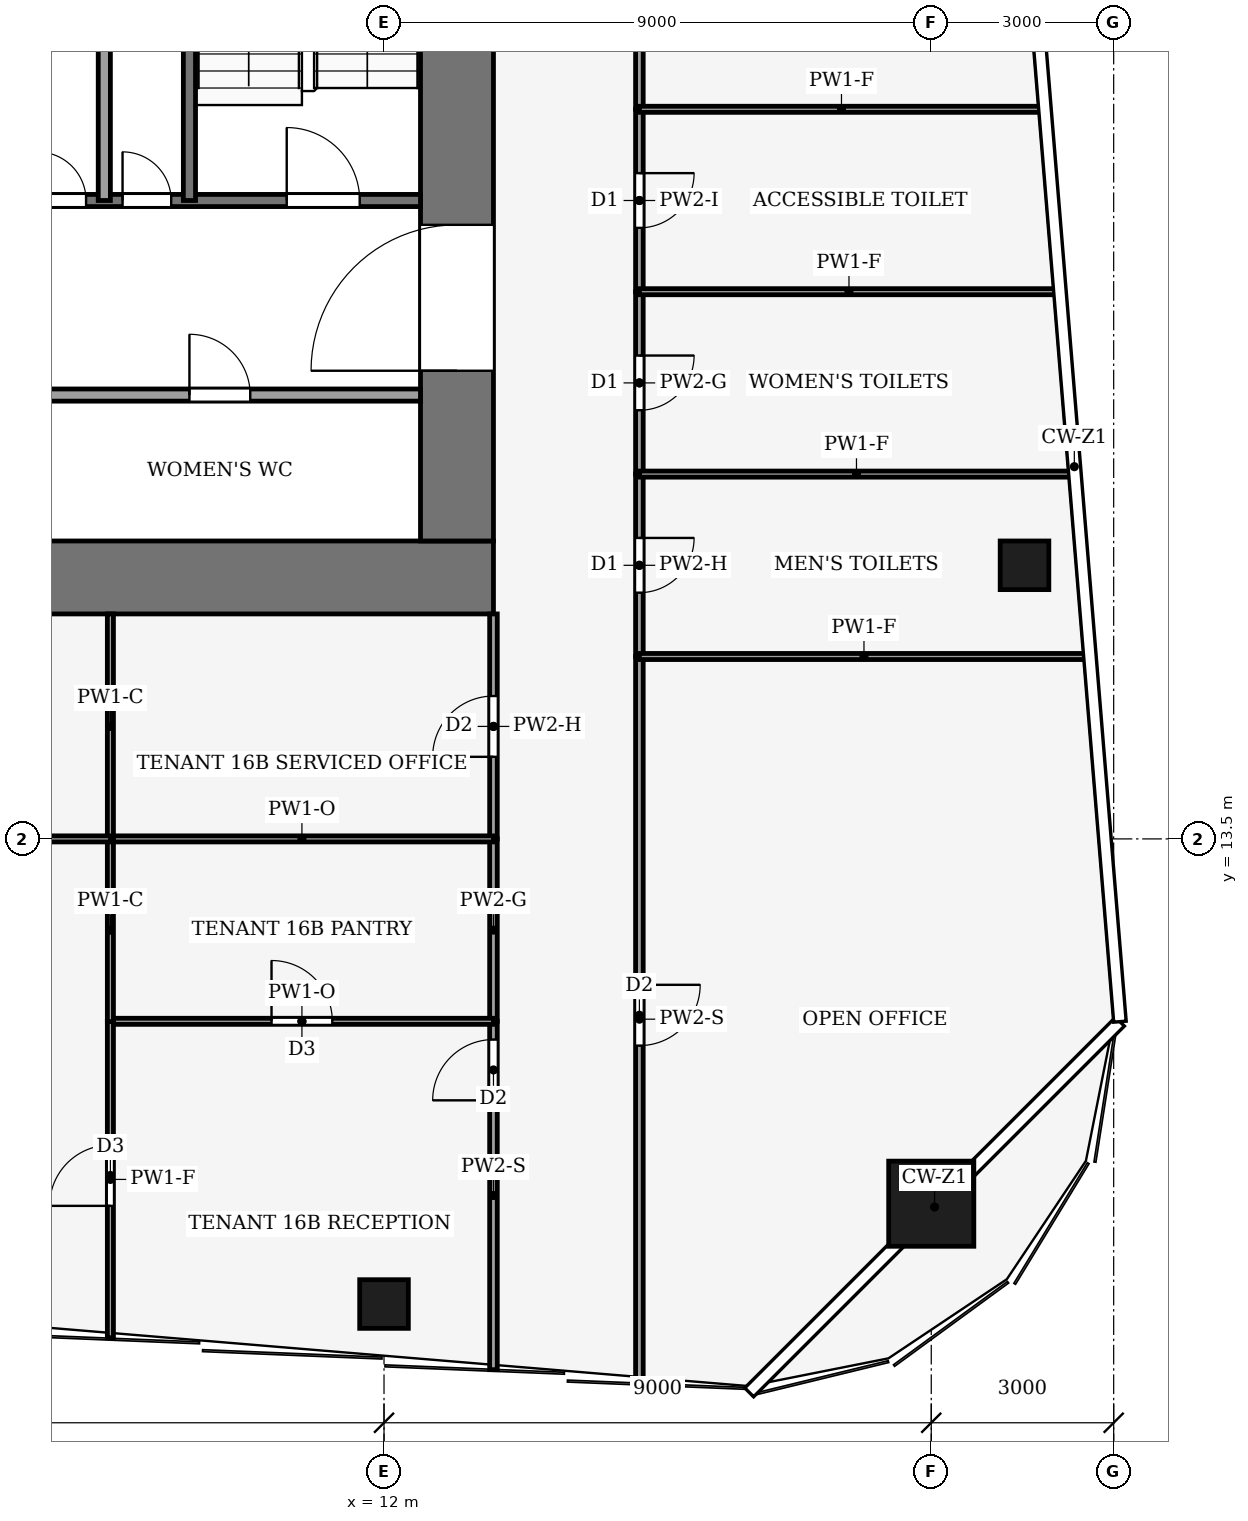
"""IFC4 building model, lengths in metres.
Left out: names, types, materials, properties, quantities, classifications, styles, units other than length and angle.
Written with IfcOpenShell. Run it as: python <this file> out.ifc"""

import sys

from ifc_helpers import new_model, si_unit, direction, frame, frame_2d, origin, origin_2d, place, context, subcontext, project, spatial, rectangle, hollow_rectangle, extrude, element, fill, save


model = new_model("IFC4")
c1 = context("Model", 3, precision=1e-05, world=origin(), true_north=direction((0.0, 1.0)))
c2 = subcontext(c1, "Body", "Model", "MODEL_VIEW")
j1 = project(units=[si_unit("LENGTHUNIT", "METRE"), si_unit("PLANEANGLEUNIT", "RADIAN")], contexts=[c1])
p1 = place(None, origin())
s1 = spatial("IfcSite", under=j1, at=p1, CompositionType="ELEMENT")
p2 = place(p1, origin())
s2 = spatial("IfcBuilding", under=s1, at=p2, CompositionType="ELEMENT")
p3 = place(p2, frame((0.0, 0.0, 74.0)))
s3 = spatial("IfcBuildingStorey", under=s2, at=p3, CompositionType="ELEMENT", Elevation=74.0)
p4 = place(p3, frame((-13.8, 17.8, -0.13), z_axis=(0.0, 0.0, 1.0), x_axis=(1.0, 0.0, 0.0)))
e1 = element("IfcWall", 1, at=p4, inside=s3, PredefinedType="SHEAR", context=c2, shape_type="SweptSolid", body=[
    extrude(rectangle(XDim=27.6, YDim=1.2, at=frame_2d((13.8, 0.0))), origin(), (0.0, 0.0, 1.0), 4.0),
])
p5 = place(p3, frame((13.2, 18.4, -0.13), z_axis=(0.0, 0.0, 1.0), x_axis=(0.0, 1.0, 0.0)))
e2 = element("IfcWall", 2, at=p5, inside=s3, PredefinedType="SHEAR", context=c2, shape_type="SweptSolid", body=[
    extrude(rectangle(XDim=19.2, YDim=1.2, at=frame_2d((9.6, 0.0))), origin(), (0.0, 0.0, 1.0), 4.0),
])
p6 = place(p5, frame((2.8, 0.0, 0.13)))
e3 = element("IfcOpeningElement", 3, at=p6, cuts=e2, PredefinedType="OPENING", context=c2, shape_type="SweptSolid", body=[
    extrude(rectangle(XDim=2.4, YDim=2.4, at=frame_2d((1.2, 1.2))), frame((0.0, 0.61, 0.0), z_axis=(0.0, -1.0, 0.0), x_axis=(1.0, 0.0, 0.0)), (0.0, 0.0, 1.0), 1.22),
])
p7 = place(p5, frame((13.3, 0.0, 0.13)))
e4 = element("IfcOpeningElement", 4, at=p7, cuts=e2, PredefinedType="OPENING", context=c2, shape_type="SweptSolid", body=[
    extrude(rectangle(XDim=2.4, YDim=2.4, at=frame_2d((1.2, 1.2))), frame((0.0, 0.61, 0.0), z_axis=(0.0, -1.0, 0.0), x_axis=(1.0, 0.0, 0.0)), (0.0, 0.0, 1.0), 1.22),
])
p8 = place(p3, frame((21.0, 7.5, 0.0), z_axis=(0.0, 0.0, 1.0), x_axis=(1.0, 0.0, 0.0)))
e5 = element("IfcColumn", 5, at=p8, inside=s3, PredefinedType="COLUMN", context=c2, shape_type="SweptSolid", body=[
    extrude(hollow_rectangle(XDim=1.4, YDim=1.4, WallThickness=0.08, at=origin_2d()), origin(), (0.0, 0.0, 1.0), 4.0),
])
for number, where, z_axis, x_axis in (
    (6, (12.0, 5.85, 0.0), (0.0, 0.0, 1.0), (1.0, 0.0, 0.0)),
    (7, (22.534, 18.0, 0.0), (0.0, 0.0, 1.0), (1.0, 0.0, 0.0)),
):
    element("IfcColumn", number, at=place(p3, frame(where, z_axis=z_axis, x_axis=x_axis)), inside=s3, PredefinedType="COLUMN", context=c2, shape_type="SweptSolid", body=[
        extrude(hollow_rectangle(XDim=0.8, YDim=0.8, WallThickness=0.04, at=origin_2d()), origin(), (0.0, 0.0, 1.0), 4.0),
    ])
p9 = place(p3, frame((6.0, 20.8, 0.0), z_axis=(0.0, 0.0, 1.0), x_axis=(1.0, 0.0, 0.0)))
e8 = element("IfcWall", 8, at=p9, inside=s3, PredefinedType="PARTITIONING", context=c2, shape_type="SweptSolid", body=[
    extrude(rectangle(XDim=6.6, YDim=0.2, at=frame_2d((3.3, 0.0))), origin(), (0.0, 0.0, 1.0), 3.87),
])
p10 = place(p9, frame((2.8, 0.0, 0.0)))
e9 = element("IfcOpeningElement", 9, at=p10, cuts=e8, PredefinedType="OPENING", context=c2, shape_type="SweptSolid", body=[
    extrude(rectangle(XDim=1.0, YDim=2.1, at=frame_2d((0.5, 1.05))), frame((0.0, 0.11, 0.0), z_axis=(0.0, -1.0, 0.0), x_axis=(1.0, 0.0, 0.0)), (0.0, 0.0, 1.0), 0.22),
])
p11 = place(p3, frame((6.0, 24.0, 0.0), z_axis=(0.0, 0.0, 1.0), x_axis=(1.0, 0.0, 0.0)))
e10 = element("IfcWall", 10, at=p11, inside=s3, PredefinedType="PARTITIONING", context=c2, shape_type="SweptSolid", body=[
    extrude(rectangle(XDim=6.6, YDim=0.2, at=frame_2d((3.3, 0.0))), origin(), (0.0, 0.0, 1.0), 3.87),
])
p12 = place(p11, frame((0.3, 0.0, 0.0)))
e11 = element("IfcOpeningElement", 11, at=p12, cuts=e10, PredefinedType="OPENING", context=c2, shape_type="SweptSolid", body=[
    extrude(rectangle(XDim=0.8, YDim=2.1, at=frame_2d((0.4, 1.05))), frame((0.0, 0.11, 0.0), z_axis=(0.0, -1.0, 0.0), x_axis=(1.0, 0.0, 0.0)), (0.0, 0.0, 1.0), 0.22),
])
p13 = place(p11, frame((1.7, 0.0, 0.0)))
e12 = element("IfcOpeningElement", 12, at=p13, cuts=e10, PredefinedType="OPENING", context=c2, shape_type="SweptSolid", body=[
    extrude(rectangle(XDim=0.8, YDim=2.1, at=frame_2d((0.4, 1.05))), frame((0.0, 0.11, 0.0), z_axis=(0.0, -1.0, 0.0), x_axis=(1.0, 0.0, 0.0)), (0.0, 0.0, 1.0), 0.22),
])
p14 = place(p11, frame((4.4, 0.0, 0.0)))
e13 = element("IfcOpeningElement", 13, at=p14, cuts=e10, PredefinedType="OPENING", context=c2, shape_type="SweptSolid", body=[
    extrude(rectangle(XDim=1.2, YDim=2.2, at=frame_2d((0.6, 1.1))), frame((0.0, 0.11, 0.0), z_axis=(0.0, -1.0, 0.0), x_axis=(1.0, 0.0, 0.0)), (0.0, 0.0, 1.0), 0.22),
])
for number, where, z_axis, x_axis in (
    (14, (7.4, 24.0, 0.0), (0.0, 0.0, 1.0), (0.0, 1.0, 0.0)),
    (15, (8.8, 24.0, 0.0), (0.0, 0.0, 1.0), (0.0, 1.0, 0.0)),
):
    element("IfcWall", number, at=place(p3, frame(where, z_axis=z_axis, x_axis=x_axis)), inside=s3, PredefinedType="PARTITIONING", context=c2, shape_type="SweptSolid", body=[
        extrude(rectangle(XDim=7.4, YDim=0.2, at=frame_2d((3.7, 0.0))), origin(), (0.0, 0.0, 1.0), 3.87),
    ])
p15 = place(p3, frame((16.2, 16.5, 0.0), z_axis=(0.0, 0.0, 1.0), x_axis=(0.0, -1.0, 0.0)))
e16 = element("IfcWall", 16, at=p15, inside=s3, PredefinedType="PARTITIONING", context=c2, shape_type="SweptSolid", body=[
    extrude(rectangle(XDim=11.93, YDim=0.125, at=frame_2d((5.965, 0.0))), origin(), (0.0, 0.0, 1.0), 3.04),
])
p16 = place(p15, frame((5.4, 0.0, 0.0)))
e17 = element("IfcOpeningElement", 17, at=p16, cuts=e16, PredefinedType="OPENING", context=c2, shape_type="SweptSolid", body=[
    extrude(rectangle(XDim=1.0, YDim=2.1, at=frame_2d((0.5, 1.05))), frame((0.0, 0.073, 0.0), z_axis=(0.0, -1.0, 0.0), x_axis=(1.0, 0.0, 0.0)), (0.0, 0.0, 1.0), 0.145),
])
p17 = place(p3, frame((16.2, 19.5, 0.0), z_axis=(0.0, 0.0, 1.0), x_axis=(0.0, -1.0, 0.0)))
e18 = element("IfcWall", 18, at=p17, inside=s3, PredefinedType="PARTITIONING", context=c2, shape_type="SweptSolid", body=[
    extrude(rectangle(XDim=3.0, YDim=0.125, at=frame_2d((1.5, 0.0))), origin(), (0.0, 0.0, 1.0), 3.14),
])
p18 = place(p17, frame((1.05, 0.0, 0.0)))
e19 = element("IfcOpeningElement", 19, at=p18, cuts=e18, PredefinedType="OPENING", context=c2, shape_type="SweptSolid", body=[
    extrude(rectangle(XDim=0.9, YDim=2.1, at=frame_2d((0.45, 1.05))), frame((0.0, 0.073, 0.0), z_axis=(0.0, -1.0, 0.0), x_axis=(1.0, 0.0, 0.0)), (0.0, 0.0, 1.0), 0.145),
])
p19 = place(p3, frame((16.2, 22.5, 0.0), z_axis=(0.0, 0.0, 1.0), x_axis=(0.0, -1.0, 0.0)))
e20 = element("IfcWall", 20, at=p19, inside=s3, PredefinedType="PARTITIONING", context=c2, shape_type="SweptSolid", body=[
    extrude(rectangle(XDim=3.0, YDim=0.125, at=frame_2d((1.5, 0.0))), origin(), (0.0, 0.0, 1.0), 3.87),
])
p20 = place(p19, frame((1.05, 0.0, 0.0)))
e21 = element("IfcOpeningElement", 21, at=p20, cuts=e20, PredefinedType="OPENING", context=c2, shape_type="SweptSolid", body=[
    extrude(rectangle(XDim=0.9, YDim=2.1, at=frame_2d((0.45, 1.05))), frame((0.0, 0.073, 0.0), z_axis=(0.0, -1.0, 0.0), x_axis=(1.0, 0.0, 0.0)), (0.0, 0.0, 1.0), 0.145),
])
p21 = place(p3, frame((16.2, 25.5, 0.0), z_axis=(0.0, 0.0, 1.0), x_axis=(0.0, -1.0, 0.0)))
e22 = element("IfcWall", 22, at=p21, inside=s3, PredefinedType="PARTITIONING", context=c2, shape_type="SweptSolid", body=[
    extrude(rectangle(XDim=3.0, YDim=0.125, at=frame_2d((1.5, 0.0))), origin(), (0.0, 0.0, 1.0), 3.48),
])
p22 = place(p21, frame((1.05, 0.0, 0.0)))
e23 = element("IfcOpeningElement", 23, at=p22, cuts=e22, PredefinedType="OPENING", context=c2, shape_type="SweptSolid", body=[
    extrude(rectangle(XDim=0.9, YDim=2.1, at=frame_2d((0.45, 1.05))), frame((0.0, 0.073, 0.0), z_axis=(0.0, -1.0, 0.0), x_axis=(1.0, 0.0, 0.0)), (0.0, 0.0, 1.0), 0.145),
])
p23 = place(p3, frame((16.2, 37.5, 0.0), z_axis=(0.0, 0.0, 1.0), x_axis=(0.0, -1.0, 0.0)))
e24 = element("IfcWall", 24, at=p23, inside=s3, PredefinedType="PARTITIONING", context=c2, shape_type="SweptSolid", body=[
    extrude(rectangle(XDim=12.0, YDim=0.125, at=frame_2d((6.0, 0.0))), origin(), (0.0, 0.0, 1.0), 3.48),
])
p24 = place(p23, frame((5.5, 0.0, 0.0)))
e25 = element("IfcOpeningElement", 25, at=p24, cuts=e24, PredefinedType="OPENING", context=c2, shape_type="SweptSolid", body=[
    extrude(rectangle(XDim=1.0, YDim=2.1, at=frame_2d((0.5, 1.05))), frame((0.0, 0.073, 0.0), z_axis=(0.0, -1.0, 0.0), x_axis=(1.0, 0.0, 0.0)), (0.0, 0.0, 1.0), 0.145),
])
p25 = place(p3, frame((13.8, 4.77, 0.0), z_axis=(0.0, 0.0, 1.0), x_axis=(0.0, 1.0, 0.0)))
e26 = element("IfcWall", 26, at=p25, inside=s3, PredefinedType="PARTITIONING", context=c2, shape_type="SweptSolid", body=[
    extrude(rectangle(XDim=5.73, YDim=0.125, at=frame_2d((2.865, 0.0))), origin(), (0.0, 0.0, 1.0), 3.04),
])
p26 = place(p25, frame((4.43, 0.0, 0.0)))
e27 = element("IfcOpeningElement", 27, at=p26, cuts=e26, PredefinedType="OPENING", context=c2, shape_type="SweptSolid", body=[
    extrude(rectangle(XDim=1.0, YDim=2.1, at=frame_2d((0.5, 1.05))), frame((0.0, 0.073, 0.0), z_axis=(0.0, -1.0, 0.0), x_axis=(1.0, 0.0, 0.0)), (0.0, 0.0, 1.0), 0.145),
])
p27 = place(p3, frame((13.8, 13.5, 0.0), z_axis=(0.0, 0.0, 1.0), x_axis=(0.0, -1.0, 0.0)))
e28 = element("IfcWall", 28, at=p27, inside=s3, PredefinedType="PARTITIONING", context=c2, shape_type="SweptSolid", body=[
    extrude(rectangle(XDim=3.0, YDim=0.125, at=frame_2d((1.5, 0.0))), origin(), (0.0, 0.0, 1.0), 3.87),
])
p28 = place(p3, frame((13.8, 13.5, 0.0), z_axis=(0.0, 0.0, 1.0), x_axis=(0.0, 1.0, 0.0)))
e29 = element("IfcWall", 29, at=p28, inside=s3, PredefinedType="PARTITIONING", context=c2, shape_type="SweptSolid", body=[
    extrude(rectangle(XDim=3.7, YDim=0.125, at=frame_2d((1.85, 0.0))), origin(), (0.0, 0.0, 1.0), 3.14),
])
p29 = place(p28, frame((1.35, 0.0, 0.0)))
e30 = element("IfcOpeningElement", 30, at=p29, cuts=e29, PredefinedType="OPENING", context=c2, shape_type="SweptSolid", body=[
    extrude(rectangle(XDim=1.0, YDim=2.1, at=frame_2d((0.5, 1.05))), frame((0.0, 0.073, 0.0), z_axis=(0.0, -1.0, 0.0), x_axis=(1.0, 0.0, 0.0)), (0.0, 0.0, 1.0), 0.145),
])
p30 = place(p3, frame((23.587, 16.5, 0.0), z_axis=(0.0, 0.0, 1.0), x_axis=(-1.0, 0.0, 0.0)))
e31 = element("IfcWall", 31, at=p30, inside=s3, PredefinedType="PARTITIONING", context=c2, shape_type="SweptSolid", body=[
    extrude(rectangle(XDim=7.387, YDim=0.1, at=frame_2d((3.693, 0.0))), origin(), (0.0, 0.0, 1.0), 3.04),
])
p31 = place(p3, frame((23.34, 19.5, 0.0), z_axis=(0.0, 0.0, 1.0), x_axis=(-1.0, 0.0, 0.0)))
e32 = element("IfcWall", 32, at=p31, inside=s3, PredefinedType="PARTITIONING", context=c2, shape_type="SweptSolid", body=[
    extrude(rectangle(XDim=7.14, YDim=0.1, at=frame_2d((3.57, 0.0))), origin(), (0.0, 0.0, 1.0), 3.04),
])
p32 = place(p3, frame((23.094, 22.5, 0.0), z_axis=(0.0, 0.0, 1.0), x_axis=(-1.0, 0.0, 0.0)))
e33 = element("IfcWall", 33, at=p32, inside=s3, PredefinedType="PARTITIONING", context=c2, shape_type="SweptSolid", body=[
    extrude(rectangle(XDim=6.894, YDim=0.1, at=frame_2d((3.447, 0.0))), origin(), (0.0, 0.0, 1.0), 3.04),
])
p33 = place(p3, frame((22.847, 25.5, 0.0), z_axis=(0.0, 0.0, 1.0), x_axis=(-1.0, 0.0, 0.0)))
e34 = element("IfcWall", 34, at=p33, inside=s3, PredefinedType="PARTITIONING", context=c2, shape_type="SweptSolid", body=[
    extrude(rectangle(XDim=6.647, YDim=0.1, at=frame_2d((3.324, 0.0))), origin(), (0.0, 0.0, 1.0), 3.04),
])
p34 = place(p3, frame((7.5, 10.5, 0.0), z_axis=(0.0, 0.0, 1.0), x_axis=(1.0, 0.0, 0.0)))
e35 = element("IfcWall", 35, at=p34, inside=s3, PredefinedType="PARTITIONING", context=c2, shape_type="SweptSolid", body=[
    extrude(rectangle(XDim=6.3, YDim=0.1, at=frame_2d((3.15, 0.0))), origin(), (0.0, 0.0, 1.0), 3.39),
])
p35 = place(p34, frame((2.65, 0.0, 0.0)))
e36 = element("IfcOpeningElement", 36, at=p35, cuts=e35, PredefinedType="OPENING", context=c2, shape_type="SweptSolid", body=[
    extrude(rectangle(XDim=1.0, YDim=2.1, at=frame_2d((0.5, 1.05))), frame((0.0, 0.06, 0.0), z_axis=(0.0, -1.0, 0.0), x_axis=(1.0, 0.0, 0.0)), (0.0, 0.0, 1.0), 0.12),
])
p36 = place(p3, frame((7.5, 5.295, 0.0), z_axis=(0.0, 0.0, 1.0), x_axis=(0.0, 1.0, 0.0)))
e37 = element("IfcWall", 37, at=p36, inside=s3, PredefinedType="PARTITIONING", context=c2, shape_type="SweptSolid", body=[
    extrude(rectangle(XDim=5.209, YDim=0.1, at=frame_2d((2.604, 0.0))), origin(), (0.0, 0.0, 1.0), 3.04),
])
p37 = place(p36, frame((2.17, 0.0, 0.0)))
e38 = element("IfcOpeningElement", 38, at=p37, cuts=e37, PredefinedType="OPENING", context=c2, shape_type="SweptSolid", body=[
    extrude(rectangle(XDim=1.0, YDim=2.1, at=frame_2d((0.5, 1.05))), frame((0.0, 0.06, 0.0), z_axis=(0.0, -1.0, 0.0), x_axis=(1.0, 0.0, 0.0)), (0.0, 0.0, 1.0), 0.12),
])
p38 = place(p3, frame((13.8, 13.5, 0.0), z_axis=(0.0, 0.0, 1.0), x_axis=(-1.0, 0.0, 0.0)))
e39 = element("IfcWall", 39, at=p38, inside=s3, PredefinedType="PARTITIONING", context=c2, shape_type="SweptSolid", body=[
    extrude(rectangle(XDim=6.3, YDim=0.1, at=frame_2d((3.15, 0.0))), origin(), (0.0, 0.0, 1.0), 3.39),
])
p39 = place(p3, frame((7.5, 13.5, 0.0), z_axis=(0.0, 0.0, 1.0), x_axis=(0.0, -1.0, 0.0)))
e40 = element("IfcWall", 40, at=p39, inside=s3, PredefinedType="PARTITIONING", context=c2, shape_type="SweptSolid", body=[
    extrude(rectangle(XDim=3.004, YDim=0.1, at=frame_2d((1.502, 0.0))), origin(), (0.0, 0.0, 1.0), 3.87),
])
p40 = place(p3, frame((7.5, 17.2, 0.0), z_axis=(0.0, 0.0, 1.0), x_axis=(0.0, -1.0, 0.0)))
e41 = element("IfcWall", 41, at=p40, inside=s3, PredefinedType="PARTITIONING", context=c2, shape_type="SweptSolid", body=[
    extrude(rectangle(XDim=3.7, YDim=0.1, at=frame_2d((1.85, 0.0))), origin(), (0.0, 0.0, 1.0), 3.87),
])
p41 = place(p3, frame((0.0, 13.5, 0.0), z_axis=(0.0, 0.0, 1.0), x_axis=(1.0, 0.0, 0.0)))
e42 = element("IfcWall", 42, at=p41, inside=s3, PredefinedType="PARTITIONING", context=c2, shape_type="SweptSolid", body=[
    extrude(rectangle(XDim=7.5, YDim=0.1, at=frame_2d((3.75, 0.0))), origin(), (0.0, 0.0, 1.0), 3.44),
])
p42 = place(p41, frame((3.25, 0.0, 0.0)))
e43 = element("IfcOpeningElement", 43, at=p42, cuts=e42, PredefinedType="OPENING", context=c2, shape_type="SweptSolid", body=[
    extrude(rectangle(XDim=1.0, YDim=2.1, at=frame_2d((0.5, 1.05))), frame((0.0, 0.06, 0.0), z_axis=(0.0, -1.0, 0.0), x_axis=(1.0, 0.0, 0.0)), (0.0, 0.0, 1.0), 0.12),
])
p43 = place(p10, origin())
e44 = element("IfcDoor", 44, at=p43, inside=s3, OperationType="SINGLE_SWING_LEFT", PredefinedType="DOOR", context=c2, shape_type="SweptSolid", body=[
    extrude(rectangle(XDim=1.0, YDim=2.1, at=frame_2d((0.5, 1.05))), frame((0.0, 0.025, 0.0), z_axis=(0.0, -1.0, 0.0), x_axis=(1.0, 0.0, 0.0)), (0.0, 0.0, 1.0), 0.05),
])
fill(e9, e44)
p44 = place(p12, origin())
e45 = element("IfcDoor", 45, at=p44, inside=s3, OperationType="SINGLE_SWING_RIGHT", PredefinedType="DOOR", context=c2, shape_type="SweptSolid", body=[
    extrude(rectangle(XDim=0.8, YDim=2.1, at=frame_2d((0.4, 1.05))), frame((0.0, 0.025, 0.0), z_axis=(0.0, -1.0, 0.0), x_axis=(1.0, 0.0, 0.0)), (0.0, 0.0, 1.0), 0.05),
])
fill(e11, e45)
p45 = place(p13, origin())
e46 = element("IfcDoor", 46, at=p45, inside=s3, OperationType="SINGLE_SWING_LEFT", PredefinedType="DOOR", context=c2, shape_type="SweptSolid", body=[
    extrude(rectangle(XDim=0.8, YDim=2.1, at=frame_2d((0.4, 1.05))), frame((0.0, 0.025, 0.0), z_axis=(0.0, -1.0, 0.0), x_axis=(1.0, 0.0, 0.0)), (0.0, 0.0, 1.0), 0.05),
])
fill(e12, e46)
p46 = place(p14, origin())
e47 = element("IfcDoor", 47, at=p46, inside=s3, OperationType="SINGLE_SWING_LEFT", PredefinedType="DOOR", context=c2, shape_type="SweptSolid", body=[
    extrude(rectangle(XDim=1.2, YDim=2.2, at=frame_2d((0.6, 1.1))), frame((0.0, 0.025, 0.0), z_axis=(0.0, -1.0, 0.0), x_axis=(1.0, 0.0, 0.0)), (0.0, 0.0, 1.0), 0.05),
])
fill(e13, e47)
p47 = place(p6, origin())
e48 = element("IfcDoor", 48, at=p47, inside=s3, OperationType="DOUBLE_DOOR_SINGLE_SWING", PredefinedType="DOOR", context=c2, shape_type="SweptSolid", body=[
    extrude(rectangle(XDim=2.4, YDim=2.4, at=frame_2d((1.2, 1.2))), frame((0.0, 0.025, 0.0), z_axis=(0.0, -1.0, 0.0), x_axis=(1.0, 0.0, 0.0)), (0.0, 0.0, 1.0), 0.05),
])
fill(e3, e48)
p48 = place(p16, origin())
e49 = element("IfcDoor", 49, at=p48, inside=s3, OperationType="SINGLE_SWING_LEFT", PredefinedType="DOOR", context=c2, shape_type="SweptSolid", body=[
    extrude(rectangle(XDim=1.0, YDim=2.1, at=frame_2d((0.5, 1.05))), frame((0.0, 0.025, 0.0), z_axis=(0.0, -1.0, 0.0), x_axis=(1.0, 0.0, 0.0)), (0.0, 0.0, 1.0), 0.05),
])
fill(e17, e49)
p49 = place(p18, origin())
e50 = element("IfcDoor", 50, at=p49, inside=s3, OperationType="SINGLE_SWING_RIGHT", PredefinedType="DOOR", context=c2, shape_type="SweptSolid", body=[
    extrude(rectangle(XDim=0.9, YDim=2.1, at=frame_2d((0.45, 1.05))), frame((0.0, 0.025, 0.0), z_axis=(0.0, -1.0, 0.0), x_axis=(1.0, 0.0, 0.0)), (0.0, 0.0, 1.0), 0.05),
])
fill(e19, e50)
p50 = place(p20, origin())
e51 = element("IfcDoor", 51, at=p50, inside=s3, OperationType="SINGLE_SWING_LEFT", PredefinedType="DOOR", context=c2, shape_type="SweptSolid", body=[
    extrude(rectangle(XDim=0.9, YDim=2.1, at=frame_2d((0.45, 1.05))), frame((0.0, 0.025, 0.0), z_axis=(0.0, -1.0, 0.0), x_axis=(1.0, 0.0, 0.0)), (0.0, 0.0, 1.0), 0.05),
])
fill(e21, e51)
p51 = place(p22, origin())
e52 = element("IfcDoor", 52, at=p51, inside=s3, OperationType="SINGLE_SWING_RIGHT", PredefinedType="DOOR", context=c2, shape_type="SweptSolid", body=[
    extrude(rectangle(XDim=0.9, YDim=2.1, at=frame_2d((0.45, 1.05))), frame((0.0, 0.025, 0.0), z_axis=(0.0, -1.0, 0.0), x_axis=(1.0, 0.0, 0.0)), (0.0, 0.0, 1.0), 0.05),
])
fill(e23, e52)
p52 = place(p26, origin())
e53 = element("IfcDoor", 53, at=p52, inside=s3, OperationType="SINGLE_SWING_RIGHT", PredefinedType="DOOR", context=c2, shape_type="SweptSolid", body=[
    extrude(rectangle(XDim=1.0, YDim=2.1, at=frame_2d((0.5, 1.05))), frame((0.0, 0.025, 0.0), z_axis=(0.0, -1.0, 0.0), x_axis=(1.0, 0.0, 0.0)), (0.0, 0.0, 1.0), 0.05),
])
fill(e27, e53)
p53 = place(p29, origin())
e54 = element("IfcDoor", 54, at=p53, inside=s3, OperationType="SINGLE_SWING_RIGHT", PredefinedType="DOOR", context=c2, shape_type="SweptSolid", body=[
    extrude(rectangle(XDim=1.0, YDim=2.1, at=frame_2d((0.5, 1.05))), frame((0.0, 0.025, 0.0), z_axis=(0.0, -1.0, 0.0), x_axis=(1.0, 0.0, 0.0)), (0.0, 0.0, 1.0), 0.05),
])
fill(e30, e54)
p54 = place(p35, origin())
e55 = element("IfcDoor", 55, at=p54, inside=s3, OperationType="SINGLE_SWING_LEFT", PredefinedType="DOOR", context=c2, shape_type="SweptSolid", body=[
    extrude(rectangle(XDim=1.0, YDim=2.1, at=frame_2d((0.5, 1.05))), frame((0.0, 0.025, 0.0), z_axis=(0.0, -1.0, 0.0), x_axis=(1.0, 0.0, 0.0)), (0.0, 0.0, 1.0), 0.05),
])
fill(e36, e55)
p55 = place(p37, origin())
e56 = element("IfcDoor", 56, at=p55, inside=s3, OperationType="SINGLE_SWING_RIGHT", PredefinedType="DOOR", context=c2, shape_type="SweptSolid", body=[
    extrude(rectangle(XDim=1.0, YDim=2.1, at=frame_2d((0.5, 1.05))), frame((0.0, 0.025, 0.0), z_axis=(0.0, -1.0, 0.0), x_axis=(1.0, 0.0, 0.0)), (0.0, 0.0, 1.0), 0.05),
])
fill(e38, e56)
save(model, sys.argv[1])
